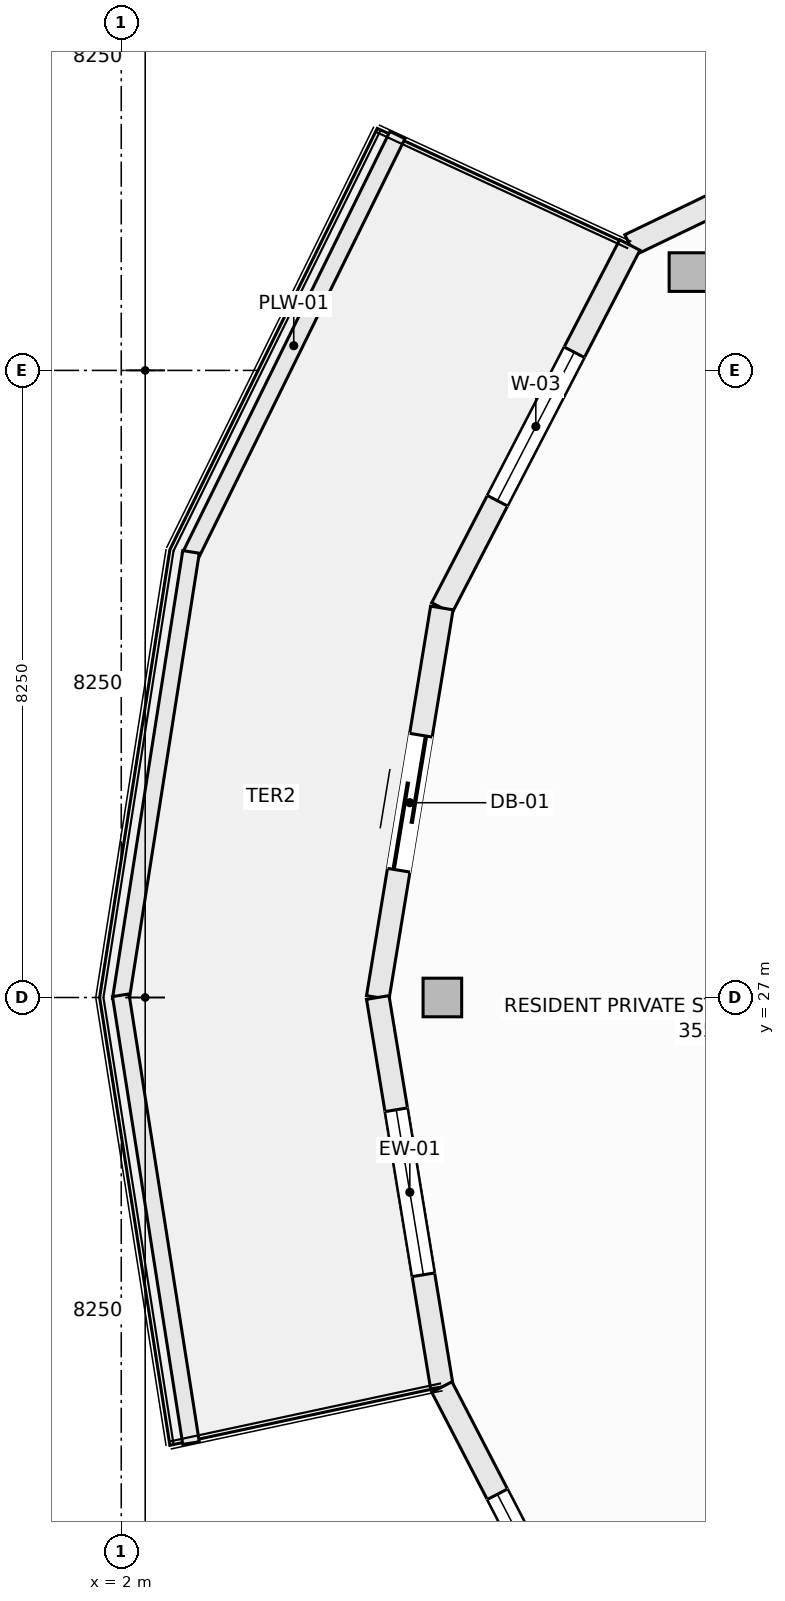
"""IFC4 building model, lengths in metres.
Left out: names, types, materials, properties, quantities, classifications, styles, units other than length and angle.
Written with IfcOpenShell. Run it as: python <this file> out.ifc"""

import sys

from ifc_helpers import new_model, si_unit, direction, frame, frame_2d, origin, origin_2d, place, context, subcontext, project, spatial, rectangle, hollow_rectangle, extrude, element, fill, save


model = new_model("IFC4")
c1 = context("Model", 3, precision=1e-05, world=origin(), true_north=direction((0.0, 1.0)))
c2 = subcontext(c1, "Body", "Model", "MODEL_VIEW")
j1 = project(units=[si_unit("LENGTHUNIT", "METRE"), si_unit("PLANEANGLEUNIT", "RADIAN")], contexts=[c1])
p1 = place(None, origin())
s1 = spatial("IfcSite", under=j1, at=p1, CompositionType="ELEMENT")
p2 = place(p1, origin())
s2 = spatial("IfcBuilding", under=s1, at=p2, CompositionType="ELEMENT")
p3 = place(p2, frame((0.0, 0.0, 209.6)))
s3 = spatial("IfcBuildingStorey", under=s2, at=p3, CompositionType="ELEMENT", Elevation=209.6)
for number, where, z_axis, x_axis in (
    (1, (9.463, 36.544, -0.27), (0.0, 0.0, 1.0), (1.0, 0.0, 0.0)),
    (2, (6.225, 27.0, -0.27), (0.0, 0.0, 1.0), (1.0, 0.0, 0.0)),
):
    element("IfcColumn", number, at=place(p3, frame(where, z_axis=z_axis, x_axis=x_axis)), inside=s3, PredefinedType="COLUMN", context=c2, shape_type="SweptSolid", body=[
        extrude(hollow_rectangle(XDim=0.508, YDim=0.508, WallThickness=0.019, at=origin_2d()), origin(), (0.0, 0.0, 1.0), 3.3),
    ])
p4 = place(p3, frame((8.691, 36.9, 0.0), z_axis=(0.0, 0.0, 1.0), x_axis=(0.901348331142, 0.433094892545, 0.0)))
e3 = element("IfcWall", 3, at=p4, inside=s3, PredefinedType="SOLIDWALL", context=c2, shape_type="SweptSolid", body=[
    extrude(rectangle(XDim=6.021, YDim=0.3, at=frame_2d((3.01, 0.0))), origin(), (0.0, 0.0, 1.0), 2.605),
])
p5 = place(p4, frame((1.91, 0.0, 0.72)))
e4 = element("IfcOpeningElement", 4, at=p5, cuts=e3, PredefinedType="OPENING", context=c2, shape_type="SweptSolid", body=[
    extrude(rectangle(XDim=2.2, YDim=1.65, at=frame_2d((1.1, 0.825))), frame((0.0, 0.16, 0.0), z_axis=(0.0, -1.0, 0.0), x_axis=(1.0, 0.0, 0.0)), (0.0, 0.0, 1.0), 0.32),
])
p6 = place(p3, frame((6.218, 32.125, 0.0), z_axis=(0.0, 0.0, 1.0), x_axis=(0.459808219482, 0.888018243786, 0.0)))
e5 = element("IfcWall", 5, at=p6, inside=s3, PredefinedType="SOLIDWALL", context=c2, shape_type="SweptSolid", body=[
    extrude(rectangle(XDim=5.378, YDim=0.3, at=frame_2d((2.689, 0.0))), origin(), (0.0, 0.0, 1.0), 2.605),
])
p7 = place(p6, frame((1.589, 0.0, 0.72)))
e6 = element("IfcOpeningElement", 6, at=p7, cuts=e5, PredefinedType="OPENING", context=c2, shape_type="SweptSolid", body=[
    extrude(rectangle(XDim=2.2, YDim=1.65, at=frame_2d((1.1, 0.825))), frame((0.0, 0.16, 0.0), z_axis=(0.0, -1.0, 0.0), x_axis=(1.0, 0.0, 0.0)), (0.0, 0.0, 1.0), 0.32),
])
p8 = place(p3, frame((5.375, 27.0, 0.0), z_axis=(0.0, 0.0, 1.0), x_axis=(0.16237087798, 0.986729799886, 0.0)))
e7 = element("IfcWall", 7, at=p8, inside=s3, PredefinedType="SOLIDWALL", context=c2, shape_type="SweptSolid", body=[
    extrude(rectangle(XDim=5.193, YDim=0.3, at=frame_2d((2.597, 0.0))), origin(), (0.0, 0.0, 1.0), 2.605),
])
p9 = place(p8, frame((1.697, 0.0, 0.0)))
e8 = element("IfcOpeningElement", 8, at=p9, cuts=e7, PredefinedType="OPENING", context=c2, shape_type="SweptSolid", body=[
    extrude(rectangle(XDim=1.8, YDim=2.25, at=frame_2d((0.9, 1.125))), frame((0.0, 0.16, 0.0), z_axis=(0.0, -1.0, 0.0), x_axis=(1.0, 0.0, 0.0)), (0.0, 0.0, 1.0), 0.32),
])
p10 = place(p3, frame((5.375, 27.0, 0.0), z_axis=(0.0, 0.0, 1.0), x_axis=(0.16237087798, -0.986729799886, 0.0)))
e9 = element("IfcWall", 9, at=p10, inside=s3, PredefinedType="SOLIDWALL", context=c2, shape_type="SweptSolid", body=[
    extrude(rectangle(XDim=5.193, YDim=0.3, at=frame_2d((2.597, 0.0))), origin(), (0.0, 0.0, 1.0), 2.605),
])
p11 = place(p10, frame((1.497, 0.0, 0.72)))
e10 = element("IfcOpeningElement", 10, at=p11, cuts=e9, PredefinedType="OPENING", context=c2, shape_type="SweptSolid", body=[
    extrude(rectangle(XDim=2.2, YDim=1.65, at=frame_2d((1.1, 0.825))), frame((0.0, 0.16, 0.0), z_axis=(0.0, -1.0, 0.0), x_axis=(1.0, 0.0, 0.0)), (0.0, 0.0, 1.0), 0.32),
])
p12 = place(p3, frame((6.218, 21.875, 0.0), z_axis=(0.0, 0.0, 1.0), x_axis=(0.459808219482, -0.888018243786, 0.0)))
e11 = element("IfcWall", 11, at=p12, inside=s3, PredefinedType="SOLIDWALL", context=c2, shape_type="SweptSolid", body=[
    extrude(rectangle(XDim=5.378, YDim=0.3, at=frame_2d((2.689, 0.0))), origin(), (0.0, 0.0, 1.0), 2.605),
])
p13 = place(p12, frame((1.589, 0.0, 0.72)))
e12 = element("IfcOpeningElement", 12, at=p13, cuts=e11, PredefinedType="OPENING", context=c2, shape_type="SweptSolid", body=[
    extrude(rectangle(XDim=2.2, YDim=1.65, at=frame_2d((1.1, 0.825))), frame((0.0, 0.16, 0.0), z_axis=(0.0, -1.0, 0.0), x_axis=(1.0, 0.0, 0.0)), (0.0, 0.0, 1.0), 0.32),
])
p14 = place(p3, frame((2.906, 32.804, 0.0), z_axis=(0.0, 0.0, 1.0), x_axis=(0.441640961804, 0.897191875162, 0.0)))
e13 = element("IfcWall", 13, at=p14, inside=s3, PredefinedType="PARAPET", context=c2, shape_type="SweptSolid", body=[
    extrude(rectangle(XDim=6.178, YDim=0.22, at=frame_2d((3.089, 0.0))), origin(), (0.0, 0.0, 1.0), 0.52),
])
for number, where, z_axis, x_axis in (
    (14, (1.993, 26.971, 0.0), (0.0, 0.0, 1.0), (0.155, 0.988, 0.0)),
    (15, (1.993, 27.029, 0.0), (0.0, 0.0, 1.0), (0.155, -0.988, 0.0)),
):
    element("IfcWall", number, at=place(p3, frame(where, z_axis=z_axis, x_axis=x_axis)), inside=s3, PredefinedType="PARAPET", context=c2, shape_type="SweptSolid", body=[
        extrude(rectangle(XDim=5.964, YDim=0.22, at=frame_2d((2.982, 0.0))), origin(), (0.0, 0.0, 1.0), 0.52),
    ])
p15 = place(p7, origin())
e16 = element("IfcWindow", 16, at=p15, inside=s3, PartitioningType="SINGLE_PANEL", PredefinedType="WINDOW", context=c2, shape_type="SweptSolid", body=[
    extrude(rectangle(XDim=2.2, YDim=1.65, at=frame_2d((1.1, 0.825))), frame((0.0, 0.03, 0.0), z_axis=(0.0, -1.0, 0.0), x_axis=(1.0, 0.0, 0.0)), (0.0, 0.0, 1.0), 0.06),
])
fill(e6, e16)
p16 = place(p9, origin())
e17 = element("IfcDoor", 17, at=p16, inside=s3, OperationType="SLIDING_TO_LEFT", PredefinedType="DOOR", context=c2, shape_type="SweptSolid", body=[
    extrude(rectangle(XDim=1.8, YDim=2.25, at=frame_2d((0.9, 1.125))), frame((0.0, 0.025, 0.0), z_axis=(0.0, -1.0, 0.0), x_axis=(1.0, 0.0, 0.0)), (0.0, 0.0, 1.0), 0.05),
])
fill(e8, e17)
p17 = place(p11, origin())
e18 = element("IfcWindow", 18, at=p17, inside=s3, PartitioningType="SINGLE_PANEL", PredefinedType="WINDOW", context=c2, shape_type="SweptSolid", body=[
    extrude(rectangle(XDim=2.2, YDim=1.65, at=frame_2d((1.1, 0.825))), frame((0.0, 0.03, 0.0), z_axis=(0.0, -1.0, 0.0), x_axis=(1.0, 0.0, 0.0)), (0.0, 0.0, 1.0), 0.06),
])
fill(e10, e18)
p18 = place(p13, origin())
e19 = element("IfcWindow", 19, at=p18, inside=s3, PartitioningType="SINGLE_PANEL", PredefinedType="WINDOW", context=c2, shape_type="SweptSolid", body=[
    extrude(rectangle(XDim=2.2, YDim=1.65, at=frame_2d((1.1, 0.825))), frame((0.0, 0.03, 0.0), z_axis=(0.0, -1.0, 0.0), x_axis=(1.0, 0.0, 0.0)), (0.0, 0.0, 1.0), 0.06),
])
fill(e12, e19)
save(model, sys.argv[1])
